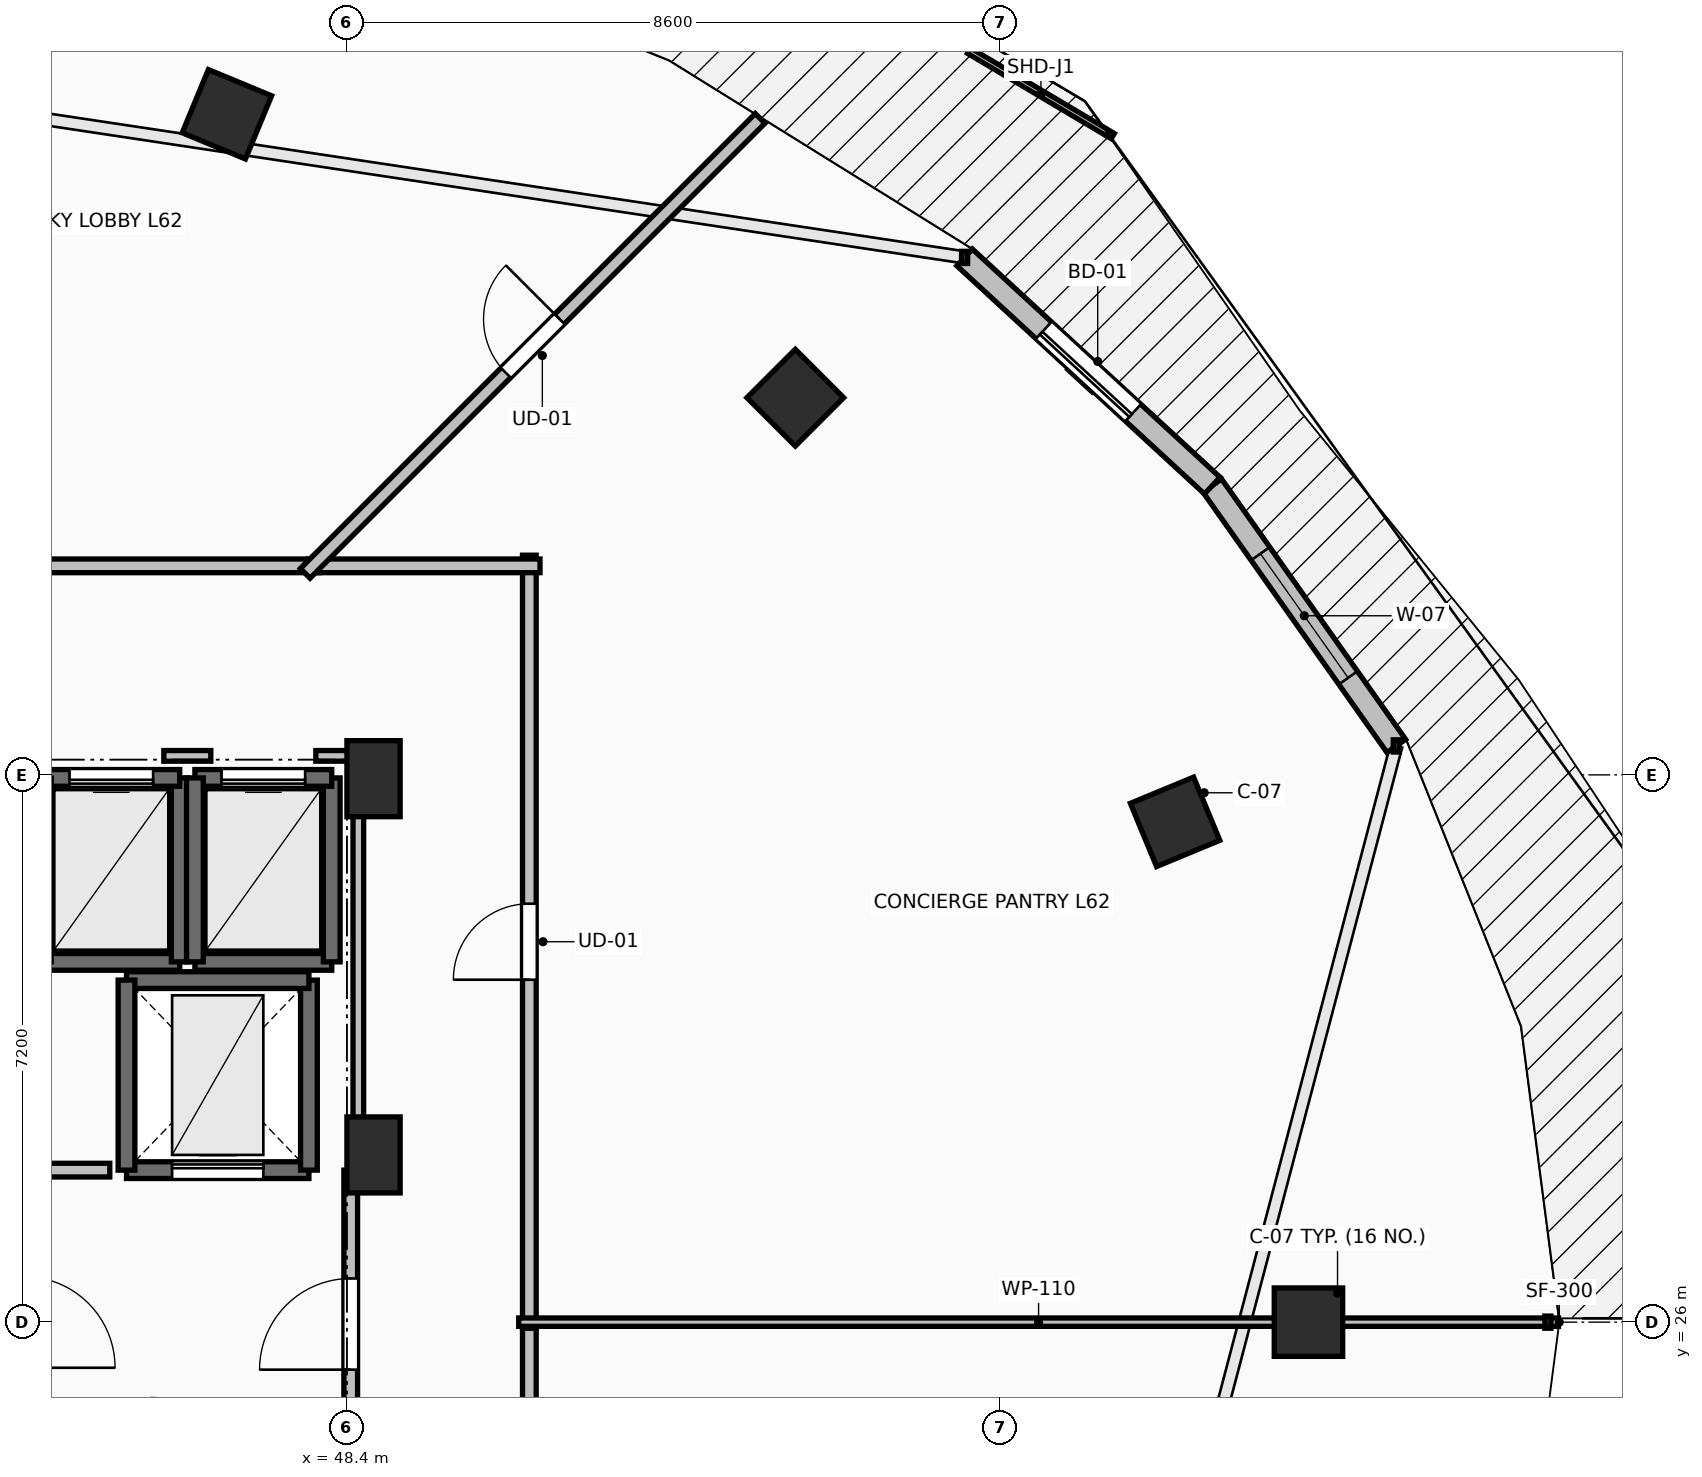
"""IFC4 building model, lengths in metres.
Left out: names, types, materials, properties, quantities, classifications, styles, units other than length and angle.
Written with IfcOpenShell. Run it as: python <this file> out.ifc"""

import sys

from ifc_helpers import new_model, si_unit, direction, frame, frame_2d, origin, origin_2d, place, context, subcontext, project, spatial, rectangle, extrude, element, fill, save


model = new_model("IFC4")
c1 = context("Model", 3, precision=1e-05, world=origin(), true_north=direction((0.0, 1.0)))
c2 = subcontext(c1, "Body", "Model", "MODEL_VIEW")
j1 = project(units=[si_unit("LENGTHUNIT", "METRE"), si_unit("PLANEANGLEUNIT", "RADIAN")], contexts=[c1])
p1 = place(None, origin())
s1 = spatial("IfcSite", under=j1, at=p1, CompositionType="ELEMENT")
p2 = place(p1, origin())
s2 = spatial("IfcBuilding", under=s1, at=p2, CompositionType="ELEMENT")
p3 = place(p2, frame((0.0, 0.0, 229.75)))
s3 = spatial("IfcBuildingStorey", under=s2, at=p3, CompositionType="ELEMENT", Elevation=229.75)
for number, where, z_axis, x_axis in (
    (1, (61.05, 26.0, 0.0), (0.0, 0.0, 1.0), (1.0, 0.0, 0.0)),
    (2, (59.295, 32.582, 0.0), (0.0, 0.0, 1.0), (0.924, 0.383, 0.0)),
    (3, (54.299, 38.162, 0.0), (0.0, 0.0, 1.0), (0.707, 0.707, 0.0)),
    (4, (46.821, 41.891, 0.0), (0.0, 0.0, 1.0), (0.383, 0.924, 0.0)),
):
    element("IfcColumn", number, at=place(p3, frame(where, z_axis=z_axis, x_axis=x_axis)), inside=s3, PredefinedType="COLUMN", context=c2, shape_type="SweptSolid", body=[
        extrude(rectangle(XDim=0.9, YDim=0.9, at=origin_2d()), origin(), (0.0, 0.0, 1.0), 4.5),
    ])
for number, where, z_axis, x_axis in (
    (5, (48.75, 33.15, 0.0), (0.0, 0.0, 1.0), (1.0, 0.0, 0.0)),
    (6, (48.75, 28.2, 0.0), (0.0, 0.0, 1.0), (1.0, 0.0, 0.0)),
):
    element("IfcColumn", number, at=place(p3, frame(where, z_axis=z_axis, x_axis=x_axis)), inside=s3, PredefinedType="PILASTER", context=c2, shape_type="SweptSolid", body=[
        extrude(rectangle(XDim=0.7, YDim=1.0, at=origin_2d()), origin(), (0.0, 0.0, 1.0), 4.5),
    ])
p4 = place(p3, frame((62.206, 33.581, 0.0), z_axis=(0.0, 0.0, 1.0), x_axis=(-0.577261247247, 0.816559521668, 0.0)))
e7 = element("IfcWall", 7, at=p4, inside=s3, PredefinedType="STANDARD", context=c2, shape_type="SweptSolid", body=[
    extrude(rectangle(XDim=4.194, YDim=0.3, at=frame_2d((2.097, 0.0))), origin(), (0.0, 0.0, 1.0), 4.24),
])
p5 = place(p4, frame((1.097, 0.0, 0.85)))
e8 = element("IfcOpeningElement", 8, at=p5, cuts=e7, PredefinedType="OPENING", context=c2, shape_type="SweptSolid", body=[
    extrude(rectangle(XDim=2.0, YDim=2.45, at=frame_2d((1.0, 1.225))), frame((0.0, 0.165, 0.0), z_axis=(0.0, -1.0, 0.0), x_axis=(1.0, 0.0, 0.0)), (0.0, 0.0, 1.0), 0.33),
])
p6 = place(p3, frame((59.784, 37.006, 0.0), z_axis=(0.0, 0.0, 1.0), x_axis=(-0.735445373611, 0.677584018727, 0.0)))
e9 = element("IfcWall", 9, at=p6, inside=s3, PredefinedType="STANDARD", context=c2, shape_type="SweptSolid", body=[
    extrude(rectangle(XDim=4.43, YDim=0.3, at=frame_2d((2.215, 0.0))), origin(), (0.0, 0.0, 1.0), 4.24),
])
p7 = place(p6, frame((1.415, 0.0, 0.0)))
e10 = element("IfcOpeningElement", 10, at=p7, cuts=e9, PredefinedType="OPENING", context=c2, shape_type="SweptSolid", body=[
    extrude(rectangle(XDim=1.6, YDim=2.3, at=frame_2d((0.8, 1.15))), frame((0.0, 0.165, 0.0), z_axis=(0.0, -1.0, 0.0), x_axis=(1.0, 0.0, 0.0)), (0.0, 0.0, 1.0), 0.33),
])
p8 = place(p3, frame((44.4, 30.74, 0.0), z_axis=(0.0, 0.0, 1.0), x_axis=(1.0, 0.0, 0.0)))
e11 = element("IfcWall", 11, at=p8, inside=s3, PredefinedType="SOLIDWALL", context=c2, shape_type="SweptSolid", body=[
    extrude(rectangle(XDim=1.8, YDim=0.22, at=frame_2d((0.9, 0.0))), origin(), (0.0, 0.0, 1.0), 4.24),
])
p9 = place(p3, frame((46.2, 30.74, 0.0), z_axis=(0.0, 0.0, 1.0), x_axis=(0.0, 1.0, 0.0)))
e12 = element("IfcWall", 12, at=p9, inside=s3, PredefinedType="SOLIDWALL", context=c2, shape_type="SweptSolid", body=[
    extrude(rectangle(XDim=2.42, YDim=0.22, at=frame_2d((1.21, 0.0))), origin(), (0.0, 0.0, 1.0), 4.24),
])
p10 = place(p3, frame((46.2, 33.16, 0.0), z_axis=(0.0, 0.0, 1.0), x_axis=(-1.0, 0.0, 0.0)))
e13 = element("IfcWall", 13, at=p10, inside=s3, PredefinedType="SOLIDWALL", context=c2, shape_type="SweptSolid", body=[
    extrude(rectangle(XDim=1.8, YDim=0.22, at=frame_2d((0.9, 0.0))), origin(), (0.0, 0.0, 1.0), 4.24),
])
p11 = place(p10, frame((0.35, 0.0, 0.0)))
e14 = element("IfcOpeningElement", 14, at=p11, cuts=e13, PredefinedType="OPENING", context=c2, shape_type="SweptSolid", body=[
    extrude(rectangle(XDim=1.1, YDim=2.2, at=frame_2d((0.55, 1.1))), frame((0.0, 0.125, 0.0), z_axis=(0.0, -1.0, 0.0), x_axis=(1.0, 0.0, 0.0)), (0.0, 0.0, 1.0), 0.25),
])
p12 = place(p3, frame((46.4, 30.74, 0.0), z_axis=(0.0, 0.0, 1.0), x_axis=(1.0, 0.0, 0.0)))
e15 = element("IfcWall", 15, at=p12, inside=s3, PredefinedType="SOLIDWALL", context=c2, shape_type="SweptSolid", body=[
    extrude(rectangle(XDim=1.8, YDim=0.22, at=frame_2d((0.9, 0.0))), origin(), (0.0, 0.0, 1.0), 4.24),
])
p13 = place(p3, frame((48.2, 30.74, 0.0), z_axis=(0.0, 0.0, 1.0), x_axis=(0.0, 1.0, 0.0)))
e16 = element("IfcWall", 16, at=p13, inside=s3, PredefinedType="SOLIDWALL", context=c2, shape_type="SweptSolid", body=[
    extrude(rectangle(XDim=2.42, YDim=0.22, at=frame_2d((1.21, 0.0))), origin(), (0.0, 0.0, 1.0), 4.24),
])
p14 = place(p3, frame((48.2, 33.16, 0.0), z_axis=(0.0, 0.0, 1.0), x_axis=(-1.0, 0.0, 0.0)))
e17 = element("IfcWall", 17, at=p14, inside=s3, PredefinedType="SOLIDWALL", context=c2, shape_type="SweptSolid", body=[
    extrude(rectangle(XDim=1.8, YDim=0.22, at=frame_2d((0.9, 0.0))), origin(), (0.0, 0.0, 1.0), 4.24),
])
p15 = place(p14, frame((0.35, 0.0, 0.0)))
e18 = element("IfcOpeningElement", 18, at=p15, cuts=e17, PredefinedType="OPENING", context=c2, shape_type="SweptSolid", body=[
    extrude(rectangle(XDim=1.1, YDim=2.2, at=frame_2d((0.55, 1.1))), frame((0.0, 0.125, 0.0), z_axis=(0.0, -1.0, 0.0), x_axis=(1.0, 0.0, 0.0)), (0.0, 0.0, 1.0), 0.25),
])
p16 = place(p3, frame((46.4, 33.16, 0.0), z_axis=(0.0, 0.0, 1.0), x_axis=(0.0, -1.0, 0.0)))
e19 = element("IfcWall", 19, at=p16, inside=s3, PredefinedType="SOLIDWALL", context=c2, shape_type="SweptSolid", body=[
    extrude(rectangle(XDim=2.42, YDim=0.22, at=frame_2d((1.21, 0.0))), origin(), (0.0, 0.0, 1.0), 4.24),
])
p17 = place(p3, frame((45.5, 28.0, 0.0), z_axis=(0.0, 0.0, 1.0), x_axis=(1.0, 0.0, 0.0)))
e20 = element("IfcWall", 20, at=p17, inside=s3, PredefinedType="SHEAR", context=c2, shape_type="SweptSolid", body=[
    extrude(rectangle(XDim=2.4, YDim=0.22, at=frame_2d((1.2, 0.0))), origin(), (0.0, 0.0, 1.0), 4.24),
])
p18 = place(p17, frame((0.6, 0.0, 0.0)))
e21 = element("IfcOpeningElement", 21, at=p18, cuts=e20, PredefinedType="OPENING", context=c2, shape_type="SweptSolid", body=[
    extrude(rectangle(XDim=1.2, YDim=2.2, at=frame_2d((0.6, 1.1))), frame((0.0, 0.125, 0.0), z_axis=(0.0, -1.0, 0.0), x_axis=(1.0, 0.0, 0.0)), (0.0, 0.0, 1.0), 0.25),
])
p19 = place(p3, frame((47.9, 28.0, 0.0), z_axis=(0.0, 0.0, 1.0), x_axis=(0.0, 1.0, 0.0)))
e22 = element("IfcWall", 22, at=p19, inside=s3, PredefinedType="SHEAR", context=c2, shape_type="SweptSolid", body=[
    extrude(rectangle(XDim=2.5, YDim=0.22, at=frame_2d((1.25, 0.0))), origin(), (0.0, 0.0, 1.0), 4.24),
])
p20 = place(p3, frame((47.9, 30.5, 0.0), z_axis=(0.0, 0.0, 1.0), x_axis=(-1.0, 0.0, 0.0)))
e23 = element("IfcWall", 23, at=p20, inside=s3, PredefinedType="SHEAR", context=c2, shape_type="SweptSolid", body=[
    extrude(rectangle(XDim=2.4, YDim=0.22, at=frame_2d((1.2, 0.0))), origin(), (0.0, 0.0, 1.0), 4.24),
])
p21 = place(p3, frame((45.5, 30.5, 0.0), z_axis=(0.0, 0.0, 1.0), x_axis=(0.0, -1.0, 0.0)))
e24 = element("IfcWall", 24, at=p21, inside=s3, PredefinedType="SHEAR", context=c2, shape_type="SweptSolid", body=[
    extrude(rectangle(XDim=2.5, YDim=0.22, at=frame_2d((1.25, 0.0))), origin(), (0.0, 0.0, 1.0), 4.24),
])
p22 = place(p3, frame((48.45, 23.95, 0.0), z_axis=(0.0, 0.0, 1.0), x_axis=(0.0, 1.0, 0.0)))
e25 = element("IfcWall", 25, at=p22, inside=s3, PredefinedType="PARTITIONING", context=c2, shape_type="SweptSolid", body=[
    extrude(rectangle(XDim=4.05, YDim=0.18, at=frame_2d((2.025, 0.0))), origin(), (0.0, 0.0, 1.0), 4.24),
])
p23 = place(p22, frame((1.425, 0.0, 0.0)))
e26 = element("IfcOpeningElement", 26, at=p23, cuts=e25, PredefinedType="OPENING", context=c2, shape_type="SweptSolid", body=[
    extrude(rectangle(XDim=1.2, YDim=2.15, at=frame_2d((0.6, 1.075))), frame((0.0, 0.105, 0.0), z_axis=(0.0, -1.0, 0.0), x_axis=(1.0, 0.0, 0.0)), (0.0, 0.0, 1.0), 0.21),
])
p24 = place(p3, frame((48.035, 35.95, 0.0), z_axis=(0.0, 0.0, 1.0), x_axis=(-1.0, 0.0, 0.0)))
e27 = element("IfcWall", 27, at=p24, inside=s3, PredefinedType="PARTITIONING", context=c2, shape_type="SweptSolid", body=[
    extrude(rectangle(XDim=8.585, YDim=0.18, at=frame_2d((4.292, 0.0))), origin(), (0.0, 0.0, 1.0), 3.432),
])
p25 = place(p3, frame((50.8, 14.05, 0.0), z_axis=(0.0, 0.0, 1.0), x_axis=(0.0, 1.0, 0.0)))
e28 = element("IfcWall", 28, at=p25, inside=s3, PredefinedType="PARTITIONING", context=c2, shape_type="SweptSolid", body=[
    extrude(rectangle(XDim=12.01, YDim=0.18, at=frame_2d((6.005, 0.0))), origin(), (0.0, 0.0, 1.0), 3.432),
])
p26 = place(p25, frame((5.505, 0.0, 0.0)))
e29 = element("IfcOpeningElement", 29, at=p26, cuts=e28, PredefinedType="OPENING", context=c2, shape_type="SweptSolid", body=[
    extrude(rectangle(XDim=1.0, YDim=2.15, at=frame_2d((0.5, 1.075))), frame((0.0, 0.105, 0.0), z_axis=(0.0, -1.0, 0.0), x_axis=(1.0, 0.0, 0.0)), (0.0, 0.0, 1.0), 0.21),
])
p27 = place(p3, frame((50.8, 25.92, 0.0), z_axis=(0.0, 0.0, 1.0), x_axis=(0.0, 1.0, 0.0)))
e30 = element("IfcWall", 30, at=p27, inside=s3, PredefinedType="PARTITIONING", context=c2, shape_type="SweptSolid", body=[
    extrude(rectangle(XDim=10.17, YDim=0.18, at=frame_2d((5.085, 0.0))), origin(), (0.0, 0.0, 1.0), 3.432),
])
p28 = place(p27, frame((4.585, 0.0, 0.0)))
e31 = element("IfcOpeningElement", 31, at=p28, cuts=e30, PredefinedType="OPENING", context=c2, shape_type="SweptSolid", body=[
    extrude(rectangle(XDim=1.0, YDim=2.15, at=frame_2d((0.5, 1.075))), frame((0.0, 0.105, 0.0), z_axis=(0.0, -1.0, 0.0), x_axis=(1.0, 0.0, 0.0)), (0.0, 0.0, 1.0), 0.21),
])
p29 = place(p3, frame((50.94, 35.95, 0.0), z_axis=(0.0, 0.0, 1.0), x_axis=(-1.0, 0.0, 0.0)))
e32 = element("IfcWall", 32, at=p29, inside=s3, PredefinedType="PARTITIONING", context=c2, shape_type="SweptSolid", body=[
    extrude(rectangle(XDim=3.045, YDim=0.18, at=frame_2d((1.522, 0.0))), origin(), (0.0, 0.0, 1.0), 3.432),
])
p30 = place(p3, frame((47.851, 35.851, 0.0), z_axis=(0.0, 0.0, 1.0), x_axis=(0.707106781187, 0.707106781187, 0.0)))
e33 = element("IfcWall", 33, at=p30, inside=s3, PredefinedType="PARTITIONING", context=c2, shape_type="SweptSolid", body=[
    extrude(rectangle(XDim=8.464, YDim=0.18, at=frame_2d((4.232, 0.0))), origin(), (0.0, 0.0, 1.0), 3.432),
])
p31 = place(p30, frame((3.732, 0.0, 0.0)))
e34 = element("IfcOpeningElement", 34, at=p31, cuts=e33, PredefinedType="OPENING", context=c2, shape_type="SweptSolid", body=[
    extrude(rectangle(XDim=1.0, YDim=2.15, at=frame_2d((0.5, 1.075))), frame((0.0, 0.105, 0.0), z_axis=(0.0, -1.0, 0.0), x_axis=(1.0, 0.0, 0.0)), (0.0, 0.0, 1.0), 0.21),
])
p32 = place(p3, frame((64.339, 26.0, 0.0), z_axis=(0.0, 0.0, 1.0), x_axis=(-1.0, 0.0, 0.0)))
e35 = element("IfcWall", 35, at=p32, inside=s3, PredefinedType="PARTITIONING", context=c2, shape_type="SweptSolid", body=[
    extrude(rectangle(XDim=13.679, YDim=0.11, at=frame_2d((6.84, 0.0))), origin(), (0.0, 0.0, 1.0), 3.432),
])
p33 = place(p3, frame((45.28, 28.0, 0.0), z_axis=(0.0, 0.0, 1.0), x_axis=(-1.0, 0.0, 0.0)))
e36 = element("IfcWall", 36, at=p33, inside=s3, PredefinedType="PARTITIONING", context=c2, shape_type="SweptSolid", body=[
    extrude(rectangle(XDim=0.915, YDim=0.18, at=frame_2d((0.458, 0.0))), origin(), (0.0, 0.0, 1.0), 4.24),
])
p34 = place(p3, frame((48.55, 28.196, 0.0), z_axis=(0.0, 0.0, 1.0), x_axis=(0.0, 1.0, 0.0)))
e37 = element("IfcWall", 37, at=p34, inside=s3, PredefinedType="PARTITIONING", context=c2, shape_type="SweptSolid", body=[
    extrude(rectangle(XDim=5.254, YDim=0.14, at=frame_2d((2.627, 0.0))), origin(), (0.0, 0.0, 1.0), 3.432),
])
p35 = place(p3, frame((48.55, 33.45, 0.0), z_axis=(0.0, 0.0, 1.0), x_axis=(-1.0, 0.0, 0.0)))
e38 = element("IfcWall", 38, at=p35, inside=s3, PredefinedType="PARTITIONING", context=c2, shape_type="SweptSolid", body=[
    extrude(rectangle(XDim=0.559, YDim=0.14, at=frame_2d((0.28, 0.0))), origin(), (0.0, 0.0, 1.0), 3.432),
])
p36 = place(p3, frame((46.609, 33.45, 0.0), z_axis=(0.0, 0.0, 1.0), x_axis=(-1.0, 0.0, 0.0)))
e39 = element("IfcWall", 39, at=p36, inside=s3, PredefinedType="PARTITIONING", context=c2, shape_type="SweptSolid", body=[
    extrude(rectangle(XDim=0.618, YDim=0.14, at=frame_2d((0.309, 0.0))), origin(), (0.0, 0.0, 1.0), 4.24),
])
p37 = place(p7, origin())
e40 = element("IfcDoor", 40, at=p37, inside=s3, OperationType="SLIDING_TO_LEFT", PredefinedType="DOOR", context=c2, shape_type="SweptSolid", body=[
    extrude(rectangle(XDim=1.6, YDim=2.3, at=frame_2d((0.8, 1.15))), frame((0.0, 0.025, 0.0), z_axis=(0.0, -1.0, 0.0), x_axis=(1.0, 0.0, 0.0)), (0.0, 0.0, 1.0), 0.05),
])
fill(e10, e40)
p38 = place(p5, origin())
e41 = element("IfcWindow", 41, at=p38, inside=s3, PartitioningType="SINGLE_PANEL", PredefinedType="WINDOW", context=c2, shape_type="SweptSolid", body=[
    extrude(rectangle(XDim=2.0, YDim=2.45, at=frame_2d((1.0, 1.225))), frame((0.0, 0.03, 0.0), z_axis=(0.0, -1.0, 0.0), x_axis=(1.0, 0.0, 0.0)), (0.0, 0.0, 1.0), 0.06),
])
fill(e8, e41)
p39 = place(p11, origin())
e42 = element("IfcDoor", 42, at=p39, inside=s3, OperationType="SLIDING_TO_LEFT", PredefinedType="DOOR", context=c2, shape_type="SweptSolid", body=[
    extrude(rectangle(XDim=1.1, YDim=2.2, at=frame_2d((0.55, 1.1))), frame((0.0, 0.025, 0.0), z_axis=(0.0, -1.0, 0.0), x_axis=(1.0, 0.0, 0.0)), (0.0, 0.0, 1.0), 0.05),
])
fill(e14, e42)
p40 = place(p15, origin())
e43 = element("IfcDoor", 43, at=p40, inside=s3, OperationType="SLIDING_TO_LEFT", PredefinedType="DOOR", context=c2, shape_type="SweptSolid", body=[
    extrude(rectangle(XDim=1.1, YDim=2.2, at=frame_2d((0.55, 1.1))), frame((0.0, 0.025, 0.0), z_axis=(0.0, -1.0, 0.0), x_axis=(1.0, 0.0, 0.0)), (0.0, 0.0, 1.0), 0.05),
])
fill(e18, e43)
p41 = place(p18, origin())
e44 = element("IfcDoor", 44, at=p41, inside=s3, OperationType="SLIDING_TO_LEFT", PredefinedType="DOOR", context=c2, shape_type="SweptSolid", body=[
    extrude(rectangle(XDim=1.2, YDim=2.2, at=frame_2d((0.6, 1.1))), frame((0.0, 0.025, 0.0), z_axis=(0.0, -1.0, 0.0), x_axis=(1.0, 0.0, 0.0)), (0.0, 0.0, 1.0), 0.05),
])
fill(e21, e44)
p42 = place(p23, origin())
e45 = element("IfcDoor", 45, at=p42, inside=s3, OperationType="SINGLE_SWING_LEFT", PredefinedType="DOOR", context=c2, shape_type="SweptSolid", body=[
    extrude(rectangle(XDim=1.2, YDim=2.15, at=frame_2d((0.6, 1.075))), frame((0.0, 0.025, 0.0), z_axis=(0.0, -1.0, 0.0), x_axis=(1.0, 0.0, 0.0)), (0.0, 0.0, 1.0), 0.05),
])
fill(e26, e45)
p43 = place(p28, origin())
e46 = element("IfcDoor", 46, at=p43, inside=s3, OperationType="SINGLE_SWING_LEFT", PredefinedType="DOOR", context=c2, shape_type="SweptSolid", body=[
    extrude(rectangle(XDim=1.0, YDim=2.15, at=frame_2d((0.5, 1.075))), frame((0.0, 0.025, 0.0), z_axis=(0.0, -1.0, 0.0), x_axis=(1.0, 0.0, 0.0)), (0.0, 0.0, 1.0), 0.05),
])
fill(e31, e46)
p44 = place(p31, origin())
e47 = element("IfcDoor", 47, at=p44, inside=s3, OperationType="SINGLE_SWING_RIGHT", PredefinedType="DOOR", context=c2, shape_type="SweptSolid", body=[
    extrude(rectangle(XDim=1.0, YDim=2.15, at=frame_2d((0.5, 1.075))), frame((0.0, 0.025, 0.0), z_axis=(0.0, -1.0, 0.0), x_axis=(1.0, 0.0, 0.0)), (0.0, 0.0, 1.0), 0.05),
])
fill(e34, e47)
save(model, sys.argv[1])
